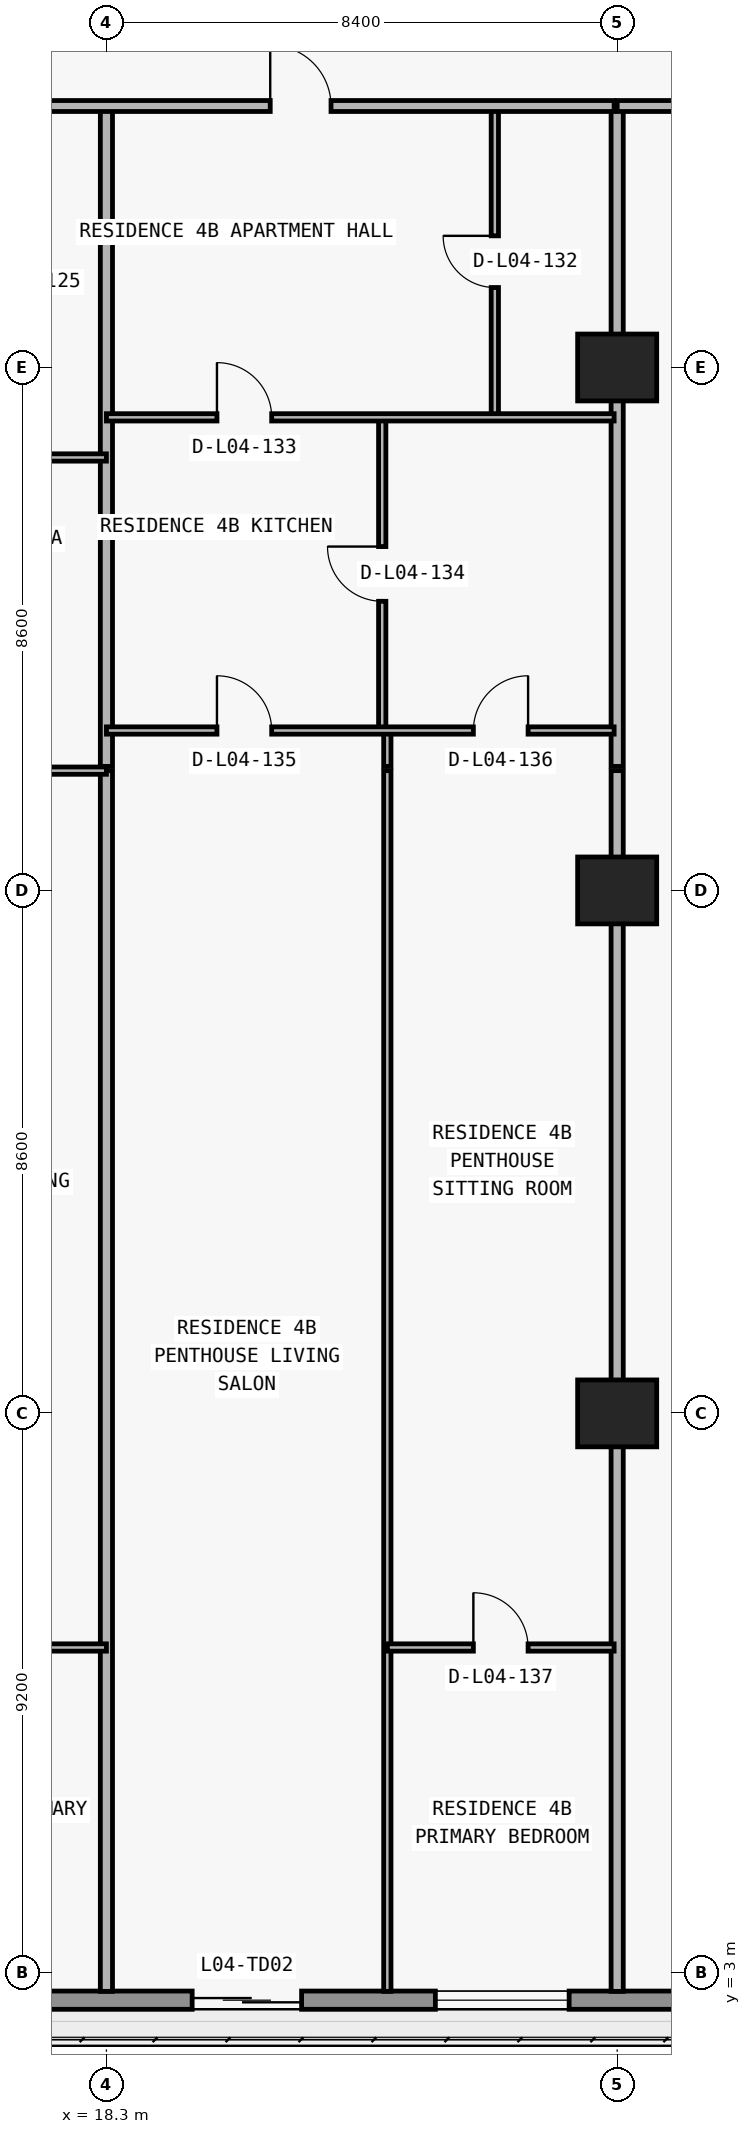
"""IFC4 building model, lengths in metres.
Left out: names, types, materials, properties, quantities, classifications, styles, units other than length and angle.
Written with IfcOpenShell. Run it as: python <this file> out.ifc"""

import sys

from ifc_helpers import new_model, si_unit, direction, frame, frame_2d, origin, origin_2d, place, context, subcontext, project, spatial, rectangle, extrude, element, fill, save


model = new_model("IFC4")
c1 = context("Model", 3, precision=1e-05, world=origin(), true_north=direction((0.0, 1.0)))
c2 = subcontext(c1, "Body", "Model", "MODEL_VIEW")
j1 = project(units=[si_unit("LENGTHUNIT", "METRE"), si_unit("PLANEANGLEUNIT", "RADIAN")], contexts=[c1])
p1 = place(None, origin())
s1 = spatial("IfcSite", under=j1, at=p1, CompositionType="ELEMENT")
p2 = place(p1, origin())
s2 = spatial("IfcBuilding", under=s1, at=p2, CompositionType="ELEMENT")
p3 = place(p2, frame((0.0, 0.0, 19.8)))
s3 = spatial("IfcBuildingStorey", under=s2, at=p3, CompositionType="ELEMENT", Elevation=19.8)
for number, where, z_axis, x_axis in (
    (1, (26.7, 12.2, 0.0), (0.0, 0.0, 1.0), (1.0, 0.0, 0.0)),
    (2, (26.7, 20.8, 0.0), (0.0, 0.0, 1.0), (1.0, 0.0, 0.0)),
    (3, (26.7, 29.4, 0.0), (0.0, 0.0, 1.0), (1.0, 0.0, 0.0)),
):
    element("IfcColumn", number, at=place(p3, frame(where, z_axis=z_axis, x_axis=x_axis)), inside=s3, PredefinedType="COLUMN", context=c2, shape_type="SweptSolid", body=[
        extrude(rectangle(XDim=1.3, YDim=1.1, at=origin_2d()), origin(), (0.0, 0.0, 1.0), 4.45),
    ])
p4 = place(p3, frame((74.15, 2.55, 0.0), z_axis=(0.0, 0.0, 1.0), x_axis=(-1.0, 0.0, 0.0)))
e4 = element("IfcWall", 4, at=p4, inside=s3, PredefinedType="STANDARD", context=c2, shape_type="SweptSolid", body=[
    extrude(rectangle(XDim=70.5, YDim=0.3, at=frame_2d((35.25, 0.0))), origin(), (0.0, 0.0, 1.0), 4.45),
])
p5 = place(p4, frame((65.875, 0.0, 0.85)))
e5 = element("IfcOpeningElement", 5, at=p5, cuts=e4, PredefinedType="OPENING", context=c2, shape_type="SweptSolid", body=[
    extrude(rectangle(XDim=3.0, YDim=2.4, at=frame_2d((1.5, 1.2))), frame((0.0, 0.16, 0.0), z_axis=(0.0, -1.0, 0.0), x_axis=(1.0, 0.0, 0.0)), (0.0, 0.0, 1.0), 0.32),
])
p6 = place(p4, frame((61.376, 0.0, 0.0)))
e6 = element("IfcOpeningElement", 6, at=p6, cuts=e4, PredefinedType="OPENING", context=c2, shape_type="SweptSolid", body=[
    extrude(rectangle(XDim=1.8, YDim=2.3, at=frame_2d((0.9, 1.15))), frame((0.0, 0.16, 0.0), z_axis=(0.0, -1.0, 0.0), x_axis=(1.0, 0.0, 0.0)), (0.0, 0.0, 1.0), 0.32),
])
p7 = place(p4, frame((56.976, 0.0, 0.85)))
e7 = element("IfcOpeningElement", 7, at=p7, cuts=e4, PredefinedType="OPENING", context=c2, shape_type="SweptSolid", body=[
    extrude(rectangle(XDim=2.2, YDim=1.55, at=frame_2d((1.1, 0.775))), frame((0.0, 0.16, 0.0), z_axis=(0.0, -1.0, 0.0), x_axis=(1.0, 0.0, 0.0)), (0.0, 0.0, 1.0), 0.32),
])
p8 = place(p4, frame((52.64, 0.0, 0.0)))
e8 = element("IfcOpeningElement", 8, at=p8, cuts=e4, PredefinedType="OPENING", context=c2, shape_type="SweptSolid", body=[
    extrude(rectangle(XDim=1.8, YDim=2.3, at=frame_2d((0.9, 1.15))), frame((0.0, 0.16, 0.0), z_axis=(0.0, -1.0, 0.0), x_axis=(1.0, 0.0, 0.0)), (0.0, 0.0, 1.0), 0.32),
])
p9 = place(p4, frame((48.24, 0.0, 0.85)))
e9 = element("IfcOpeningElement", 9, at=p9, cuts=e4, PredefinedType="OPENING", context=c2, shape_type="SweptSolid", body=[
    extrude(rectangle(XDim=2.2, YDim=1.55, at=frame_2d((1.1, 0.775))), frame((0.0, 0.16, 0.0), z_axis=(0.0, -1.0, 0.0), x_axis=(1.0, 0.0, 0.0)), (0.0, 0.0, 1.0), 0.32),
])
p10 = place(p4, frame((34.35, 0.0, 0.0)))
e10 = element("IfcOpeningElement", 10, at=p10, cuts=e4, PredefinedType="OPENING", context=c2, shape_type="SweptSolid", body=[
    extrude(rectangle(XDim=1.8, YDim=2.3, at=frame_2d((0.9, 1.15))), frame((0.0, 0.16, 0.0), z_axis=(0.0, -1.0, 0.0), x_axis=(1.0, 0.0, 0.0)), (0.0, 0.0, 1.0), 0.32),
])
p11 = place(p4, frame((17.95, 0.0, 0.0)))
e11 = element("IfcOpeningElement", 11, at=p11, cuts=e4, PredefinedType="OPENING", context=c2, shape_type="SweptSolid", body=[
    extrude(rectangle(XDim=1.8, YDim=2.3, at=frame_2d((0.9, 1.15))), frame((0.0, 0.16, 0.0), z_axis=(0.0, -1.0, 0.0), x_axis=(1.0, 0.0, 0.0)), (0.0, 0.0, 1.0), 0.32),
])
p12 = place(p4, frame((9.35, 0.0, 0.85)))
e12 = element("IfcOpeningElement", 12, at=p12, cuts=e4, PredefinedType="OPENING", context=c2, shape_type="SweptSolid", body=[
    extrude(rectangle(XDim=2.2, YDim=1.55, at=frame_2d((1.1, 0.775))), frame((0.0, 0.16, 0.0), z_axis=(0.0, -1.0, 0.0), x_axis=(1.0, 0.0, 0.0)), (0.0, 0.0, 1.0), 0.32),
])
p13 = place(p4, frame((1.625, 0.0, 0.85)))
e13 = element("IfcOpeningElement", 13, at=p13, cuts=e4, PredefinedType="OPENING", context=c2, shape_type="SweptSolid", body=[
    extrude(rectangle(XDim=3.0, YDim=2.4, at=frame_2d((1.5, 1.2))), frame((0.0, 0.16, 0.0), z_axis=(0.0, -1.0, 0.0), x_axis=(1.0, 0.0, 0.0)), (0.0, 0.0, 1.0), 0.32),
])
p14 = place(p3, frame((18.3, 2.695, 0.0), z_axis=(0.0, 0.0, 1.0), x_axis=(0.0, 1.0, 0.0)))
e14 = element("IfcWall", 14, at=p14, inside=s3, PredefinedType="PARTITIONING", context=c2, shape_type="SweptSolid", body=[
    extrude(rectangle(XDim=20.075, YDim=0.2, at=frame_2d((10.038, 0.0))), origin(), (0.0, 0.0, 1.0), 4.05),
])
p15 = place(p3, frame((18.3, 22.84, 0.0), z_axis=(0.0, 0.0, 1.0), x_axis=(0.0, 1.0, 0.0)))
e15 = element("IfcWall", 15, at=p15, inside=s3, PredefinedType="PARTITIONING", context=c2, shape_type="SweptSolid", body=[
    extrude(rectangle(XDim=10.86, YDim=0.2, at=frame_2d((5.43, 0.0))), origin(), (0.0, 0.0, 1.0), 4.45),
])
p16 = place(p3, frame((22.836, 23.43, 0.0), z_axis=(0.0, 0.0, 1.0), x_axis=(0.0, 1.0, 0.0)))
e16 = element("IfcWall", 16, at=p16, inside=s3, PredefinedType="PARTITIONING", context=c2, shape_type="SweptSolid", body=[
    extrude(rectangle(XDim=5.15, YDim=0.12, at=frame_2d((2.575, 0.0))), origin(), (0.0, 0.0, 1.0), 4.45),
])
p17 = place(p16, frame((2.125, 0.0, 0.0)))
e17 = element("IfcOpeningElement", 17, at=p17, cuts=e16, PredefinedType="OPENING", context=c2, shape_type="SweptSolid", body=[
    extrude(rectangle(XDim=0.9, YDim=2.15, at=frame_2d((0.45, 1.075))), frame((0.0, 0.07, 0.0), z_axis=(0.0, -1.0, 0.0), x_axis=(1.0, 0.0, 0.0)), (0.0, 0.0, 1.0), 0.14),
])
p18 = place(p3, frame((22.92, 2.695, 0.0), z_axis=(0.0, 0.0, 1.0), x_axis=(0.0, 1.0, 0.0)))
e18 = element("IfcWall", 18, at=p18, inside=s3, PredefinedType="PARTITIONING", context=c2, shape_type="SweptSolid", body=[
    extrude(rectangle(XDim=20.075, YDim=0.12, at=frame_2d((10.038, 0.0))), origin(), (0.0, 0.0, 1.0), 4.05),
])
p19 = place(p3, frame((22.92, 22.84, 0.0), z_axis=(0.0, 0.0, 1.0), x_axis=(0.0, 1.0, 0.0)))
e19 = element("IfcWall", 19, at=p19, inside=s3, PredefinedType="PARTITIONING", context=c2, shape_type="SweptSolid", body=[
    extrude(rectangle(XDim=0.585, YDim=0.12, at=frame_2d((0.292, 0.0))), origin(), (0.0, 0.0, 1.0), 4.45),
])
p20 = place(p3, frame((24.688, 28.58, 0.0), z_axis=(0.0, 0.0, 1.0), x_axis=(0.0, 1.0, 0.0)))
e20 = element("IfcWall", 20, at=p20, inside=s3, PredefinedType="PARTITIONING", context=c2, shape_type="SweptSolid", body=[
    extrude(rectangle(XDim=5.12, YDim=0.12, at=frame_2d((2.56, 0.0))), origin(), (0.0, 0.0, 1.0), 4.45),
])
p21 = place(p20, frame((2.135, 0.0, 0.0)))
e21 = element("IfcOpeningElement", 21, at=p21, cuts=e20, PredefinedType="OPENING", context=c2, shape_type="SweptSolid", body=[
    extrude(rectangle(XDim=0.85, YDim=2.1, at=frame_2d((0.425, 1.05))), frame((0.0, 0.07, 0.0), z_axis=(0.0, -1.0, 0.0), x_axis=(1.0, 0.0, 0.0)), (0.0, 0.0, 1.0), 0.14),
])
p22 = place(p3, frame((26.7, 2.695, 0.0), z_axis=(0.0, 0.0, 1.0), x_axis=(0.0, 1.0, 0.0)))
e22 = element("IfcWall", 22, at=p22, inside=s3, PredefinedType="PARTITIONING", context=c2, shape_type="SweptSolid", body=[
    extrude(rectangle(XDim=20.075, YDim=0.2, at=frame_2d((10.038, 0.0))), origin(), (0.0, 0.0, 1.0), 3.014),
])
p23 = place(p3, frame((26.7, 22.84, 0.0), z_axis=(0.0, 0.0, 1.0), x_axis=(0.0, 1.0, 0.0)))
e23 = element("IfcWall", 23, at=p23, inside=s3, PredefinedType="PARTITIONING", context=c2, shape_type="SweptSolid", body=[
    extrude(rectangle(XDim=10.86, YDim=0.2, at=frame_2d((5.43, 0.0))), origin(), (0.0, 0.0, 1.0), 3.414),
])
p24 = place(p3, frame((13.848, 8.35, 0.0), z_axis=(0.0, 0.0, 1.0), x_axis=(1.0, 0.0, 0.0)))
e24 = element("IfcWall", 24, at=p24, inside=s3, PredefinedType="PARTITIONING", context=c2, shape_type="SweptSolid", body=[
    extrude(rectangle(XDim=4.452, YDim=0.12, at=frame_2d((2.226, 0.0))), origin(), (0.0, 0.0, 1.0), 4.45),
])
p25 = place(p24, frame((1.776, 0.0, 0.0)))
e25 = element("IfcOpeningElement", 25, at=p25, cuts=e24, PredefinedType="OPENING", context=c2, shape_type="SweptSolid", body=[
    extrude(rectangle(XDim=0.9, YDim=2.15, at=frame_2d((0.45, 1.075))), frame((0.0, 0.07, 0.0), z_axis=(0.0, -1.0, 0.0), x_axis=(1.0, 0.0, 0.0)), (0.0, 0.0, 1.0), 0.14),
])
p26 = place(p3, frame((22.92, 8.35, 0.0), z_axis=(0.0, 0.0, 1.0), x_axis=(1.0, 0.0, 0.0)))
e26 = element("IfcWall", 26, at=p26, inside=s3, PredefinedType="PARTITIONING", context=c2, shape_type="SweptSolid", body=[
    extrude(rectangle(XDim=3.73, YDim=0.12, at=frame_2d((1.865, 0.0))), origin(), (0.0, 0.0, 1.0), 4.45),
])
p27 = place(p26, frame((1.415, 0.0, 0.0)))
e27 = element("IfcOpeningElement", 27, at=p27, cuts=e26, PredefinedType="OPENING", context=c2, shape_type="SweptSolid", body=[
    extrude(rectangle(XDim=0.9, YDim=2.15, at=frame_2d((0.45, 1.075))), frame((0.0, 0.07, 0.0), z_axis=(0.0, -1.0, 0.0), x_axis=(1.0, 0.0, 0.0)), (0.0, 0.0, 1.0), 0.14),
])
p28 = place(p3, frame((9.9, 22.77, 0.0), z_axis=(0.0, 0.0, 1.0), x_axis=(1.0, 0.0, 0.0)))
e28 = element("IfcWall", 28, at=p28, inside=s3, PredefinedType="PARTITIONING", context=c2, shape_type="SweptSolid", body=[
    extrude(rectangle(XDim=8.4, YDim=0.12, at=frame_2d((4.2, 0.0))), origin(), (0.0, 0.0, 1.0), 4.45),
])
p29 = place(p28, frame((1.524, 0.0, 0.0)))
e29 = element("IfcOpeningElement", 29, at=p29, cuts=e28, PredefinedType="OPENING", context=c2, shape_type="SweptSolid", body=[
    extrude(rectangle(XDim=0.9, YDim=2.15, at=frame_2d((0.45, 1.075))), frame((0.0, 0.07, 0.0), z_axis=(0.0, -1.0, 0.0), x_axis=(1.0, 0.0, 0.0)), (0.0, 0.0, 1.0), 0.14),
])
p30 = place(p28, frame((6.143, 0.0, 0.0)))
e30 = element("IfcOpeningElement", 30, at=p30, cuts=e28, PredefinedType="OPENING", context=c2, shape_type="SweptSolid", body=[
    extrude(rectangle(XDim=0.9, YDim=2.15, at=frame_2d((0.45, 1.075))), frame((0.0, 0.07, 0.0), z_axis=(0.0, -1.0, 0.0), x_axis=(1.0, 0.0, 0.0)), (0.0, 0.0, 1.0), 0.14),
])
p31 = place(p3, frame((18.3, 23.43, 0.0), z_axis=(0.0, 0.0, 1.0), x_axis=(1.0, 0.0, 0.0)))
e31 = element("IfcWall", 31, at=p31, inside=s3, PredefinedType="PARTITIONING", context=c2, shape_type="SweptSolid", body=[
    extrude(rectangle(XDim=8.35, YDim=0.12, at=frame_2d((4.175, 0.0))), origin(), (0.0, 0.0, 1.0), 4.45),
])
p32 = place(p31, frame((1.818, 0.0, 0.0)))
e32 = element("IfcOpeningElement", 32, at=p32, cuts=e31, PredefinedType="OPENING", context=c2, shape_type="SweptSolid", body=[
    extrude(rectangle(XDim=0.9, YDim=2.15, at=frame_2d((0.45, 1.075))), frame((0.0, 0.07, 0.0), z_axis=(0.0, -1.0, 0.0), x_axis=(1.0, 0.0, 0.0)), (0.0, 0.0, 1.0), 0.14),
])
p33 = place(p31, frame((6.035, 0.0, 0.0)))
e33 = element("IfcOpeningElement", 33, at=p33, cuts=e31, PredefinedType="OPENING", context=c2, shape_type="SweptSolid", body=[
    extrude(rectangle(XDim=0.9, YDim=2.15, at=frame_2d((0.45, 1.075))), frame((0.0, 0.07, 0.0), z_axis=(0.0, -1.0, 0.0), x_axis=(1.0, 0.0, 0.0)), (0.0, 0.0, 1.0), 0.14),
])
p34 = place(p3, frame((9.9, 27.92, 0.0), z_axis=(0.0, 0.0, 1.0), x_axis=(1.0, 0.0, 0.0)))
e34 = element("IfcWall", 34, at=p34, inside=s3, PredefinedType="PARTITIONING", context=c2, shape_type="SweptSolid", body=[
    extrude(rectangle(XDim=8.4, YDim=0.12, at=frame_2d((4.2, 0.0))), origin(), (0.0, 0.0, 1.0), 4.45),
])
p35 = place(p34, frame((1.943, 0.0, 0.0)))
e35 = element("IfcOpeningElement", 35, at=p35, cuts=e34, PredefinedType="OPENING", context=c2, shape_type="SweptSolid", body=[
    extrude(rectangle(XDim=0.9, YDim=2.15, at=frame_2d((0.45, 1.075))), frame((0.0, 0.07, 0.0), z_axis=(0.0, -1.0, 0.0), x_axis=(1.0, 0.0, 0.0)), (0.0, 0.0, 1.0), 0.14),
])
p36 = place(p3, frame((18.3, 28.58, 0.0), z_axis=(0.0, 0.0, 1.0), x_axis=(1.0, 0.0, 0.0)))
e36 = element("IfcWall", 36, at=p36, inside=s3, PredefinedType="PARTITIONING", context=c2, shape_type="SweptSolid", body=[
    extrude(rectangle(XDim=8.35, YDim=0.12, at=frame_2d((4.175, 0.0))), origin(), (0.0, 0.0, 1.0), 4.45),
])
p37 = place(p36, frame((1.818, 0.0, 0.0)))
e37 = element("IfcOpeningElement", 37, at=p37, cuts=e36, PredefinedType="OPENING", context=c2, shape_type="SweptSolid", body=[
    extrude(rectangle(XDim=0.9, YDim=2.15, at=frame_2d((0.45, 1.075))), frame((0.0, 0.07, 0.0), z_axis=(0.0, -1.0, 0.0), x_axis=(1.0, 0.0, 0.0)), (0.0, 0.0, 1.0), 0.14),
])
p38 = place(p3, frame((3.65, 33.7, 0.0), z_axis=(0.0, 0.0, 1.0), x_axis=(1.0, 0.0, 0.0)))
e38 = element("IfcWall", 38, at=p38, inside=s3, PredefinedType="PARTITIONING", context=c2, shape_type="SweptSolid", body=[
    extrude(rectangle(XDim=23.0, YDim=0.18, at=frame_2d((11.5, 0.0))), origin(), (0.0, 0.0, 1.0), 4.45),
])
p39 = place(p38, frame((2.6, 0.0, 0.0)))
e39 = element("IfcOpeningElement", 39, at=p39, cuts=e38, PredefinedType="OPENING", context=c2, shape_type="SweptSolid", body=[
    extrude(rectangle(XDim=1.05, YDim=2.15, at=frame_2d((0.525, 1.075))), frame((0.0, 0.1, 0.0), z_axis=(0.0, -1.0, 0.0), x_axis=(1.0, 0.0, 0.0)), (0.0, 0.0, 1.0), 0.2),
])
p40 = place(p38, frame((9.059, 0.0, 0.0)))
e40 = element("IfcOpeningElement", 40, at=p40, cuts=e38, PredefinedType="OPENING", context=c2, shape_type="SweptSolid", body=[
    extrude(rectangle(XDim=1.0, YDim=2.2, at=frame_2d((0.5, 1.1))), frame((0.0, 0.1, 0.0), z_axis=(0.0, -1.0, 0.0), x_axis=(1.0, 0.0, 0.0)), (0.0, 0.0, 1.0), 0.2),
])
p41 = place(p38, frame((17.344, 0.0, 0.0)))
e41 = element("IfcOpeningElement", 41, at=p41, cuts=e38, PredefinedType="OPENING", context=c2, shape_type="SweptSolid", body=[
    extrude(rectangle(XDim=1.0, YDim=2.2, at=frame_2d((0.5, 1.1))), frame((0.0, 0.1, 0.0), z_axis=(0.0, -1.0, 0.0), x_axis=(1.0, 0.0, 0.0)), (0.0, 0.0, 1.0), 0.2),
])
p42 = place(p3, frame((26.7, 33.7, 0.0), z_axis=(0.0, 0.0, 1.0), x_axis=(1.0, 0.0, 0.0)))
e42 = element("IfcWall", 42, at=p42, inside=s3, PredefinedType="PARTITIONING", context=c2, shape_type="SweptSolid", body=[
    extrude(rectangle(XDim=47.45, YDim=0.18, at=frame_2d((23.725, 0.0))), origin(), (0.0, 0.0, 1.0), 4.45),
])
p43 = place(p42, frame((11.675, 0.0, 0.0)))
e43 = element("IfcOpeningElement", 43, at=p43, cuts=e42, PredefinedType="OPENING", context=c2, shape_type="SweptSolid", body=[
    extrude(rectangle(XDim=1.05, YDim=2.15, at=frame_2d((0.525, 1.075))), frame((0.0, 0.1, 0.0), z_axis=(0.0, -1.0, 0.0), x_axis=(1.0, 0.0, 0.0)), (0.0, 0.0, 1.0), 0.2),
])
p44 = place(p42, frame((27.25, 0.0, 0.0)))
e44 = element("IfcOpeningElement", 44, at=p44, cuts=e42, PredefinedType="OPENING", context=c2, shape_type="SweptSolid", body=[
    extrude(rectangle(XDim=1.0, YDim=2.2, at=frame_2d((0.5, 1.1))), frame((0.0, 0.1, 0.0), z_axis=(0.0, -1.0, 0.0), x_axis=(1.0, 0.0, 0.0)), (0.0, 0.0, 1.0), 0.2),
])
p45 = place(p42, frame((43.8, 0.0, 0.0)))
e45 = element("IfcOpeningElement", 45, at=p45, cuts=e42, PredefinedType="OPENING", context=c2, shape_type="SweptSolid", body=[
    extrude(rectangle(XDim=1.05, YDim=2.15, at=frame_2d((0.525, 1.075))), frame((0.0, 0.1, 0.0), z_axis=(0.0, -1.0, 0.0), x_axis=(1.0, 0.0, 0.0)), (0.0, 0.0, 1.0), 0.2),
])
p46 = place(p8, origin())
e46 = element("IfcDoor", 46, at=p46, inside=s3, OperationType="DOUBLE_DOOR_SLIDING", PredefinedType="DOOR", context=c2, shape_type="SweptSolid", body=[
    extrude(rectangle(XDim=1.8, YDim=2.3, at=frame_2d((0.9, 1.15))), frame((0.0, 0.025, 0.0), z_axis=(0.0, -1.0, 0.0), x_axis=(1.0, 0.0, 0.0)), (0.0, 0.0, 1.0), 0.05),
])
fill(e8, e46)
p47 = place(p9, origin())
e47 = element("IfcWindow", 47, at=p47, inside=s3, PartitioningType="SINGLE_PANEL", PredefinedType="WINDOW", context=c2, shape_type="SweptSolid", body=[
    extrude(rectangle(XDim=2.2, YDim=1.55, at=frame_2d((1.1, 0.775))), frame((0.0, 0.03, 0.0), z_axis=(0.0, -1.0, 0.0), x_axis=(1.0, 0.0, 0.0)), (0.0, 0.0, 1.0), 0.06),
])
fill(e9, e47)
p48 = place(p41, origin())
e48 = element("IfcDoor", 48, at=p48, inside=s3, OperationType="SINGLE_SWING_LEFT", PredefinedType="DOOR", context=c2, shape_type="SweptSolid", body=[
    extrude(rectangle(XDim=1.0, YDim=2.2, at=frame_2d((0.5, 1.1))), frame((0.0, 0.025, 0.0), z_axis=(0.0, -1.0, 0.0), x_axis=(1.0, 0.0, 0.0)), (0.0, 0.0, 1.0), 0.05),
])
fill(e41, e48)
p49 = place(p21, origin())
e49 = element("IfcDoor", 49, at=p49, inside=s3, OperationType="SINGLE_SWING_RIGHT", PredefinedType="DOOR", context=c2, shape_type="SweptSolid", body=[
    extrude(rectangle(XDim=0.85, YDim=2.1, at=frame_2d((0.425, 1.05))), frame((0.0, 0.025, 0.0), z_axis=(0.0, -1.0, 0.0), x_axis=(1.0, 0.0, 0.0)), (0.0, 0.0, 1.0), 0.05),
])
fill(e21, e49)
p50 = place(p37, origin())
e50 = element("IfcDoor", 50, at=p50, inside=s3, OperationType="SINGLE_SWING_LEFT", PredefinedType="DOOR", context=c2, shape_type="SweptSolid", body=[
    extrude(rectangle(XDim=0.9, YDim=2.15, at=frame_2d((0.45, 1.075))), frame((0.0, 0.025, 0.0), z_axis=(0.0, -1.0, 0.0), x_axis=(1.0, 0.0, 0.0)), (0.0, 0.0, 1.0), 0.05),
])
fill(e37, e50)
p51 = place(p17, origin())
e51 = element("IfcDoor", 51, at=p51, inside=s3, OperationType="SINGLE_SWING_RIGHT", PredefinedType="DOOR", context=c2, shape_type="SweptSolid", body=[
    extrude(rectangle(XDim=0.9, YDim=2.15, at=frame_2d((0.45, 1.075))), frame((0.0, 0.025, 0.0), z_axis=(0.0, -1.0, 0.0), x_axis=(1.0, 0.0, 0.0)), (0.0, 0.0, 1.0), 0.05),
])
fill(e17, e51)
p52 = place(p32, origin())
e52 = element("IfcDoor", 52, at=p52, inside=s3, OperationType="SINGLE_SWING_LEFT", PredefinedType="DOOR", context=c2, shape_type="SweptSolid", body=[
    extrude(rectangle(XDim=0.9, YDim=2.15, at=frame_2d((0.45, 1.075))), frame((0.0, 0.025, 0.0), z_axis=(0.0, -1.0, 0.0), x_axis=(1.0, 0.0, 0.0)), (0.0, 0.0, 1.0), 0.05),
])
fill(e32, e52)
p53 = place(p33, origin())
e53 = element("IfcDoor", 53, at=p53, inside=s3, OperationType="SINGLE_SWING_RIGHT", PredefinedType="DOOR", context=c2, shape_type="SweptSolid", body=[
    extrude(rectangle(XDim=0.9, YDim=2.15, at=frame_2d((0.45, 1.075))), frame((0.0, 0.025, 0.0), z_axis=(0.0, -1.0, 0.0), x_axis=(1.0, 0.0, 0.0)), (0.0, 0.0, 1.0), 0.05),
])
fill(e33, e53)
p54 = place(p27, origin())
e54 = element("IfcDoor", 54, at=p54, inside=s3, OperationType="SINGLE_SWING_LEFT", PredefinedType="DOOR", context=c2, shape_type="SweptSolid", body=[
    extrude(rectangle(XDim=0.9, YDim=2.15, at=frame_2d((0.45, 1.075))), frame((0.0, 0.025, 0.0), z_axis=(0.0, -1.0, 0.0), x_axis=(1.0, 0.0, 0.0)), (0.0, 0.0, 1.0), 0.05),
])
fill(e27, e54)
save(model, sys.argv[1])
